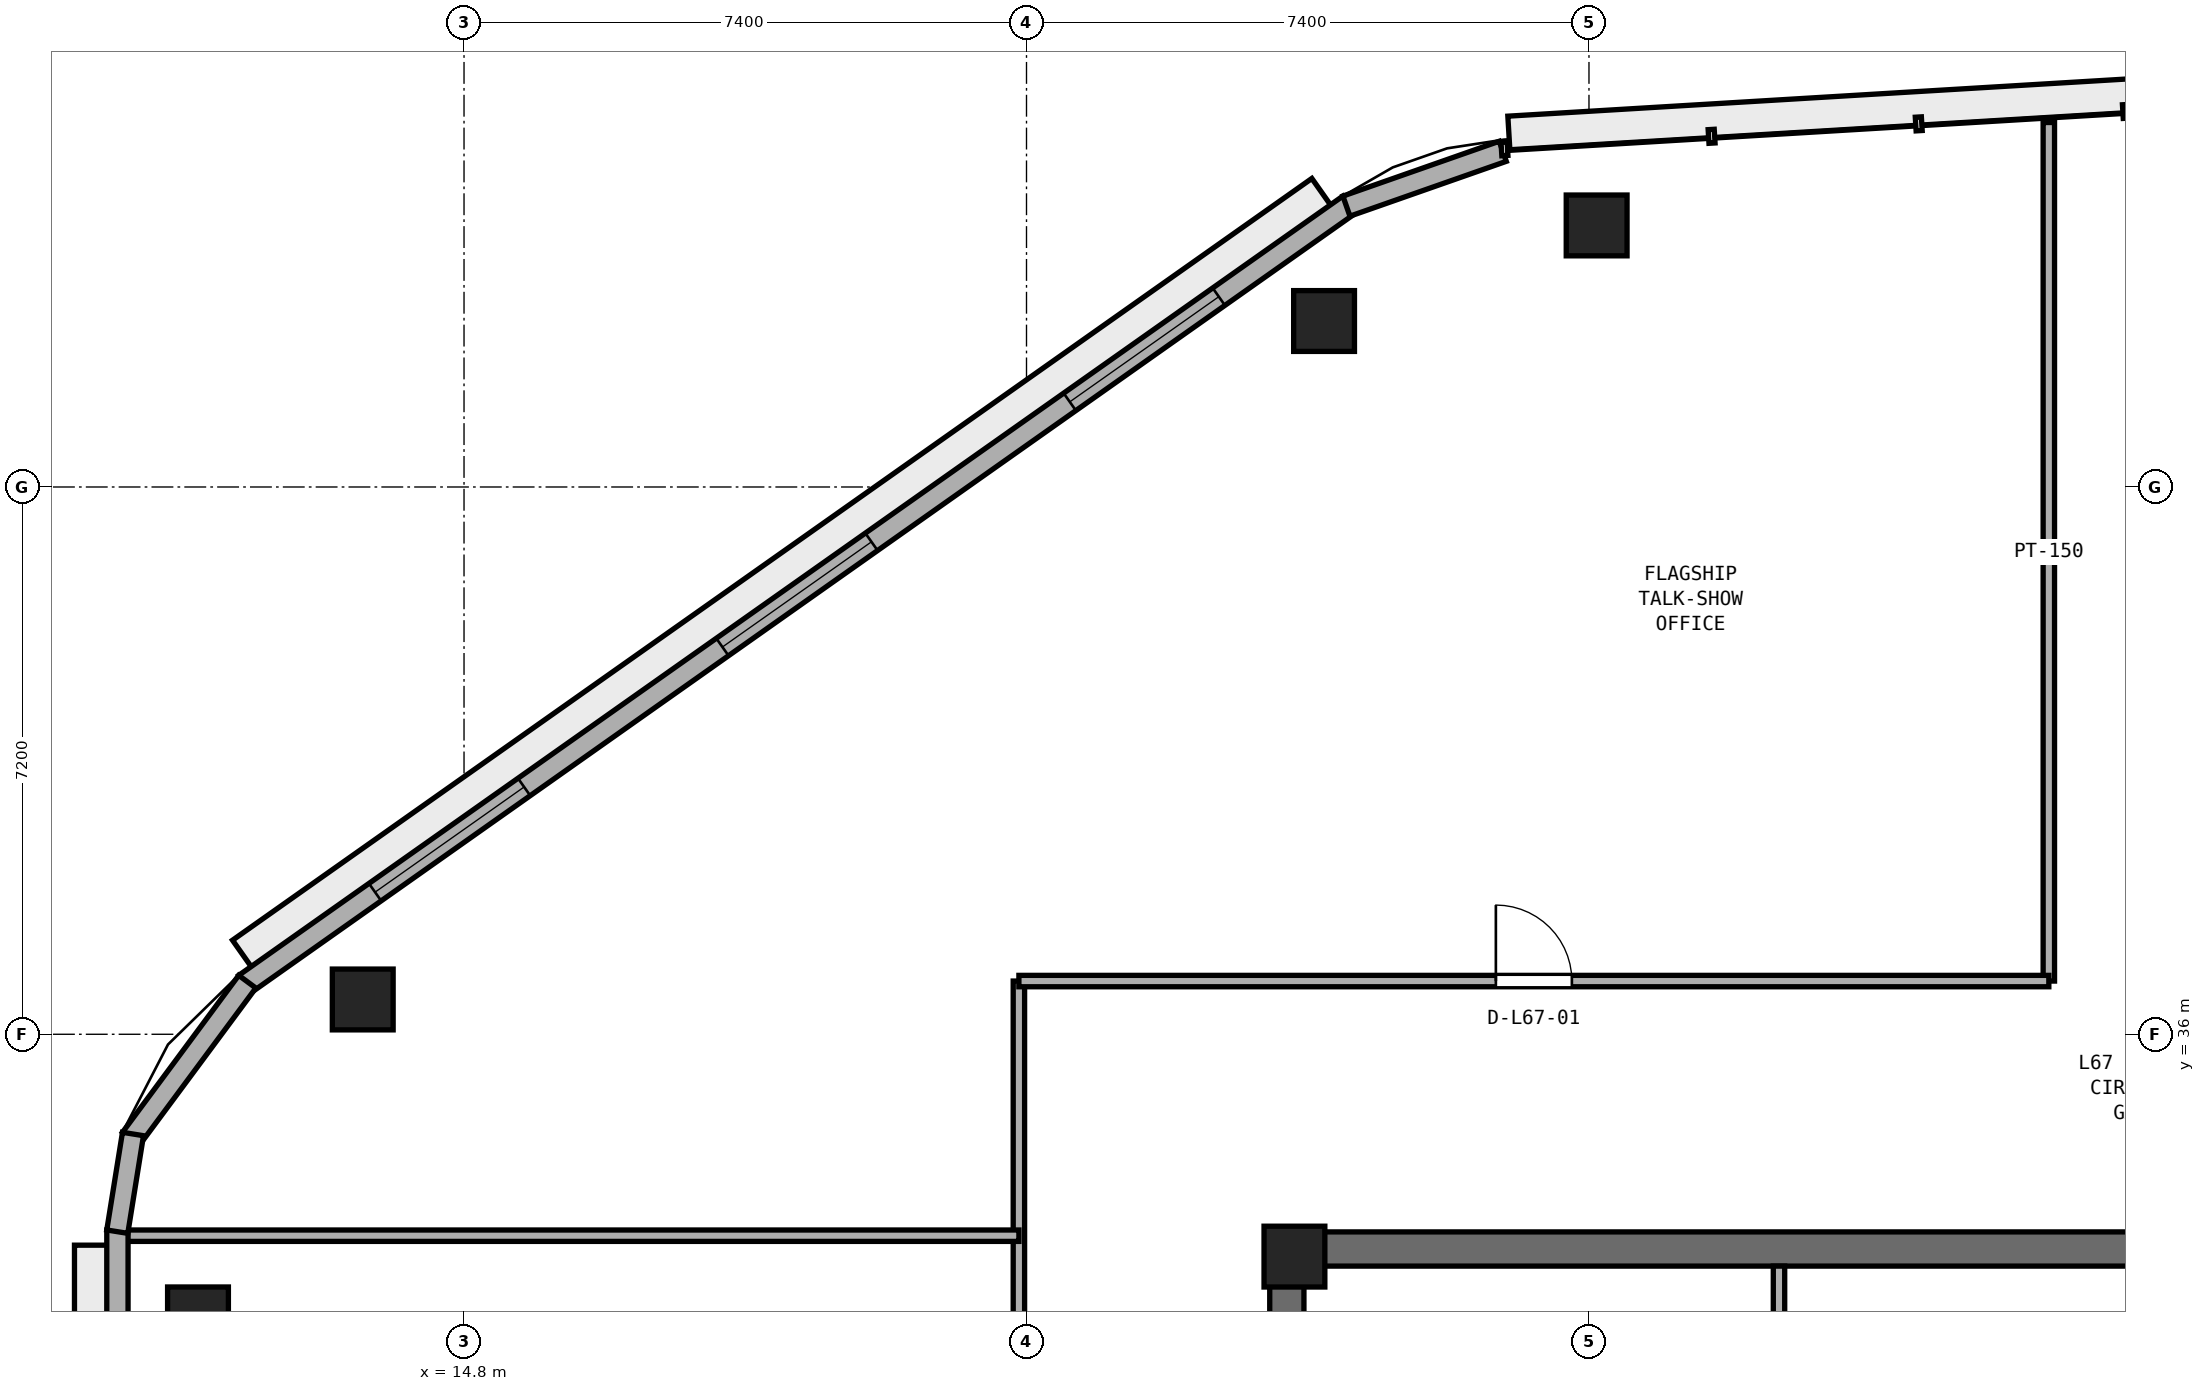
"""IFC4 building model, lengths in metres.
Left out: names, types, materials, properties, quantities, classifications, styles, units other than length and angle.
Written with IfcOpenShell. Run it as: python <this file> out.ifc"""

import sys

from ifc_helpers import new_model, si_unit, direction, frame, frame_2d, origin, origin_2d, place, context, subcontext, project, spatial, rectangle, extrude, element, fill, save


model = new_model("IFC4")
c1 = context("Model", 3, precision=1e-05, world=origin(), true_north=direction((0.0, 1.0)))
c2 = subcontext(c1, "Body", "Model", "MODEL_VIEW")
j1 = project(units=[si_unit("LENGTHUNIT", "METRE"), si_unit("PLANEANGLEUNIT", "RADIAN")], contexts=[c1])
p1 = place(None, origin())
s1 = spatial("IfcSite", under=j1, at=p1, CompositionType="ELEMENT")
p2 = place(p1, origin())
s2 = spatial("IfcBuilding", under=s1, at=p2, CompositionType="ELEMENT")
p3 = place(p2, frame((0.0, 0.0, 263.0)))
s3 = spatial("IfcBuildingStorey", under=s2, at=p3, CompositionType="ELEMENT", Elevation=263.0)
p4 = place(p3, frame((25.4, 33.175, 0.0), z_axis=(0.0, 0.0, 1.0), x_axis=(1.0, 0.0, 0.0)))
e1 = element("IfcWall", 1, at=p4, inside=s3, PredefinedType="SHEAR", context=c2, shape_type="SweptSolid", body=[
    extrude(rectangle(XDim=23.2, YDim=0.45, at=frame_2d((11.6, 0.0))), origin(), (0.0, 0.0, 1.0), 3.51),
])
p5 = place(p3, frame((25.625, 17.45, 0.0), z_axis=(0.0, 0.0, 1.0), x_axis=(0.0, 1.0, 0.0)))
e2 = element("IfcWall", 2, at=p5, inside=s3, PredefinedType="SHEAR", context=c2, shape_type="SweptSolid", body=[
    extrude(rectangle(XDim=15.5, YDim=0.45, at=frame_2d((7.75, 0.0))), origin(), (0.0, 0.0, 1.0), 3.51),
])
p6 = place(p5, frame((7.0, 0.0, 0.0)))
e3 = element("IfcOpeningElement", 3, at=p6, cuts=e2, PredefinedType="OPENING", context=c2, shape_type="SweptSolid", body=[
    extrude(rectangle(XDim=1.5, YDim=2.15, at=frame_2d((0.75, 1.075))), frame((0.0, 0.235, 0.0), z_axis=(0.0, -1.0, 0.0), x_axis=(1.0, 0.0, 0.0)), (0.0, 0.0, 1.0), 0.47),
])
p7 = place(p3, frame((25.725, 33.075, 0.0), z_axis=(0.0, 0.0, 1.0), x_axis=(1.0, 0.0, 0.0)))
e4 = element("IfcColumn", 4, at=p7, inside=s3, PredefinedType="PILASTER", context=c2, shape_type="SweptSolid", body=[
    extrude(rectangle(XDim=0.8, YDim=0.8, at=origin_2d()), origin(), (0.0, 0.0, 1.0), 3.8),
])
for number, where, z_axis, x_axis in (
    (5, (29.701, 46.641, 0.0), (0.0, 0.0, 1.0), (1.0, 0.0, 0.0)),
    (6, (26.115, 45.384, 0.0), (0.0, 0.0, 1.0), (1.0, 0.0, 0.0)),
    (7, (13.467, 36.458, 0.0), (0.0, 0.0, 1.0), (1.0, 0.0, 0.0)),
    (8, (11.3, 32.275, 0.0), (0.0, 0.0, 1.0), (1.0, 0.0, 0.0)),
):
    element("IfcColumn", number, at=place(p3, frame(where, z_axis=z_axis, x_axis=x_axis)), inside=s3, PredefinedType="COLUMN", context=c2, shape_type="SweptSolid", body=[
        extrude(rectangle(XDim=0.8, YDim=0.8, at=origin_2d()), origin(), (0.0, 0.0, 1.0), 3.8),
    ])
p8 = place(p3, frame((32.1, 30.65, 0.0), z_axis=(0.0, 0.0, 1.0), x_axis=(0.0, 1.0, 0.0)))
e9 = element("IfcWall", 9, at=p8, inside=s3, PredefinedType="PARTITIONING", context=c2, shape_type="SweptSolid", body=[
    extrude(rectangle(XDim=2.3, YDim=0.15, at=frame_2d((1.15, 0.0))), origin(), (0.0, 0.0, 1.0), 3.51),
])
p9 = place(p3, frame((35.65, 36.7, 0.0), z_axis=(0.0, 0.0, 1.0), x_axis=(0.0, 1.0, 0.0)))
e10 = element("IfcWall", 10, at=p9, inside=s3, PredefinedType="PARTITIONING", context=c2, shape_type="SweptSolid", body=[
    extrude(rectangle(XDim=11.295, YDim=0.15, at=frame_2d((5.648, 0.0))), origin(), (0.0, 0.0, 1.0), 3.51),
])
p10 = place(p3, frame((22.1, 6.248, 0.0), z_axis=(0.0, 0.0, 1.0), x_axis=(0.0, 1.0, 0.0)))
e11 = element("IfcWall", 11, at=p10, inside=s3, PredefinedType="PARTITIONING", context=c2, shape_type="SweptSolid", body=[
    extrude(rectangle(XDim=30.452, YDim=0.15, at=frame_2d((15.226, 0.0))), origin(), (0.0, 0.0, 1.0), 3.51),
])
p11 = place(p10, frame((11.252, 0.0, 0.0)))
e12 = element("IfcOpeningElement", 12, at=p11, cuts=e11, PredefinedType="OPENING", context=c2, shape_type="SweptSolid", body=[
    extrude(rectangle(XDim=0.9, YDim=2.1, at=frame_2d((0.45, 1.05))), frame((0.0, 0.085, 0.0), z_axis=(0.0, -1.0, 0.0), x_axis=(1.0, 0.0, 0.0)), (0.0, 0.0, 1.0), 0.17),
])
p12 = place(p10, frame((21.077, 0.0, 0.0)))
e13 = element("IfcOpeningElement", 13, at=p12, cuts=e11, PredefinedType="OPENING", context=c2, shape_type="SweptSolid", body=[
    extrude(rectangle(XDim=0.9, YDim=2.1, at=frame_2d((0.45, 1.05))), frame((0.0, 0.085, 0.0), z_axis=(0.0, -1.0, 0.0), x_axis=(1.0, 0.0, 0.0)), (0.0, 0.0, 1.0), 0.17),
])
p13 = place(p3, frame((10.305, 33.35, 0.0), z_axis=(0.0, 0.0, 1.0), x_axis=(1.0, 0.0, 0.0)))
e14 = element("IfcWall", 14, at=p13, inside=s3, PredefinedType="PARTITIONING", context=c2, shape_type="SweptSolid", body=[
    extrude(rectangle(XDim=11.795, YDim=0.15, at=frame_2d((5.897, 0.0))), origin(), (0.0, 0.0, 1.0), 3.51),
])
p14 = place(p3, frame((22.1, 36.7, 0.0), z_axis=(0.0, 0.0, 1.0), x_axis=(1.0, 0.0, 0.0)))
e15 = element("IfcWall", 15, at=p14, inside=s3, PredefinedType="PARTITIONING", context=c2, shape_type="SweptSolid", body=[
    extrude(rectangle(XDim=13.55, YDim=0.15, at=frame_2d((6.775, 0.0))), origin(), (0.0, 0.0, 1.0), 3.51),
])
p15 = place(p14, frame((6.275, 0.0, 0.0)))
e16 = element("IfcOpeningElement", 16, at=p15, cuts=e15, PredefinedType="OPENING", context=c2, shape_type="SweptSolid", body=[
    extrude(rectangle(XDim=1.0, YDim=2.12, at=frame_2d((0.5, 1.06))), frame((0.0, 0.085, 0.0), z_axis=(0.0, -1.0, 0.0), x_axis=(1.0, 0.0, 0.0)), (0.0, 0.0, 1.0), 0.17),
])
p16 = place(p3, frame((26.443, 46.913, 0.0), z_axis=(0.0, 0.0, 1.0), x_axis=(-0.817024179766, -0.576603407619, 0.0)))
e17 = element("IfcWall", 17, at=p16, inside=s3, PredefinedType="STANDARD", context=c2, shape_type="SweptSolid", body=[
    extrude(rectangle(XDim=17.78, YDim=0.28, at=frame_2d((8.89, 0.0))), origin(), (0.0, 0.0, 1.0), 3.51),
])
p17 = place(p16, frame((2.097, 0.0, 0.9)))
e18 = element("IfcOpeningElement", 18, at=p17, cuts=e17, PredefinedType="OPENING", context=c2, shape_type="SweptSolid", body=[
    extrude(rectangle(XDim=2.4, YDim=1.75, at=frame_2d((1.2, 0.875))), frame((0.0, 0.15, 0.0), z_axis=(0.0, -1.0, 0.0), x_axis=(1.0, 0.0, 0.0)), (0.0, 0.0, 1.0), 0.3),
])
p18 = place(p16, frame((7.69, 0.0, 0.9)))
e19 = element("IfcOpeningElement", 19, at=p18, cuts=e17, PredefinedType="OPENING", context=c2, shape_type="SweptSolid", body=[
    extrude(rectangle(XDim=2.4, YDim=1.75, at=frame_2d((1.2, 0.875))), frame((0.0, 0.15, 0.0), z_axis=(0.0, -1.0, 0.0), x_axis=(1.0, 0.0, 0.0)), (0.0, 0.0, 1.0), 0.3),
])
p19 = place(p16, frame((13.283, 0.0, 0.9)))
e20 = element("IfcOpeningElement", 20, at=p19, cuts=e17, PredefinedType="OPENING", context=c2, shape_type="SweptSolid", body=[
    extrude(rectangle(XDim=2.4, YDim=1.75, at=frame_2d((1.2, 0.875))), frame((0.0, 0.15, 0.0), z_axis=(0.0, -1.0, 0.0), x_axis=(1.0, 0.0, 0.0)), (0.0, 0.0, 1.0), 0.3),
])
p20 = place(p3, frame((10.24, 33.425, 0.0), z_axis=(0.0, 0.0, 1.0), x_axis=(0.0, -1.0, 0.0)))
e21 = element("IfcWall", 21, at=p20, inside=s3, PredefinedType="STANDARD", context=c2, shape_type="SweptSolid", body=[
    extrude(rectangle(XDim=17.257, YDim=0.28, at=frame_2d((8.628, 0.0))), origin(), (0.0, 0.0, 1.0), 3.51),
])
p21 = place(p20, frame((8.078, 0.0, 0.0)))
e22 = element("IfcOpeningElement", 22, at=p21, cuts=e21, PredefinedType="OPENING", context=c2, shape_type="SweptSolid", body=[
    extrude(rectangle(XDim=1.1, YDim=2.2, at=frame_2d((0.55, 1.1))), frame((0.0, 0.15, 0.0), z_axis=(0.0, -1.0, 0.0), x_axis=(1.0, 0.0, 0.0)), (0.0, 0.0, 1.0), 0.3),
])
p22 = place(p20, frame((2.01, 0.0, 0.9)))
e23 = element("IfcOpeningElement", 23, at=p22, cuts=e21, PredefinedType="OPENING", context=c2, shape_type="SweptSolid", body=[
    extrude(rectangle(XDim=2.4, YDim=1.75, at=frame_2d((1.2, 0.875))), frame((0.0, 0.15, 0.0), z_axis=(0.0, -1.0, 0.0), x_axis=(1.0, 0.0, 0.0)), (0.0, 0.0, 1.0), 0.3),
])
p23 = place(p20, frame((12.847, 0.0, 0.9)))
e24 = element("IfcOpeningElement", 24, at=p23, cuts=e21, PredefinedType="OPENING", context=c2, shape_type="SweptSolid", body=[
    extrude(rectangle(XDim=2.4, YDim=1.75, at=frame_2d((1.2, 0.875))), frame((0.0, 0.15, 0.0), z_axis=(0.0, -1.0, 0.0), x_axis=(1.0, 0.0, 0.0)), (0.0, 0.0, 1.0), 0.3),
])
p24 = place(p3, frame((28.466, 47.616, 0.0), z_axis=(0.0, 0.0, 1.0), x_axis=(-0.94368711622, -0.330839276206, 0.0)))
e25 = element("IfcWall", 25, at=p24, inside=s3, PredefinedType="STANDARD", context=c2, shape_type="SweptSolid", body=[
    extrude(rectangle(XDim=2.18, YDim=0.28, at=frame_2d((1.09, 0.0))), origin(), (0.0, 0.0, 1.0), 3.51),
])
p25 = place(p3, frame((11.948, 36.692, 0.0), z_axis=(0.0, 0.0, 1.0), x_axis=(-0.595170751493, -0.803599263668, 0.0)))
e26 = element("IfcWall", 26, at=p25, inside=s3, PredefinedType="STANDARD", context=c2, shape_type="SweptSolid", body=[
    extrude(rectangle(XDim=2.57, YDim=0.28, at=frame_2d((1.285, 0.0))), origin(), (0.0, 0.0, 1.0), 3.51),
])
p26 = place(p3, frame((10.445, 34.688, 0.0), z_axis=(0.0, 0.0, 1.0), x_axis=(-0.158524605336, -0.987355027081, 0.0)))
e27 = element("IfcWall", 27, at=p26, inside=s3, PredefinedType="STANDARD", context=c2, shape_type="SweptSolid", body=[
    extrude(rectangle(XDim=1.301, YDim=0.28, at=frame_2d((0.651, 0.0))), origin(), (0.0, 0.0, 1.0), 3.51),
])
p27 = place(p15, origin())
e28 = element("IfcDoor", 28, at=p27, inside=s3, OperationType="SINGLE_SWING_LEFT", PredefinedType="DOOR", context=c2, shape_type="SweptSolid", body=[
    extrude(rectangle(XDim=1.0, YDim=2.12, at=frame_2d((0.5, 1.06))), frame((0.0, 0.025, 0.0), z_axis=(0.0, -1.0, 0.0), x_axis=(1.0, 0.0, 0.0)), (0.0, 0.0, 1.0), 0.05),
])
fill(e16, e28)
p28 = place(p17, origin())
e29 = element("IfcWindow", 29, at=p28, inside=s3, PartitioningType="SINGLE_PANEL", PredefinedType="WINDOW", context=c2, shape_type="SweptSolid", body=[
    extrude(rectangle(XDim=2.4, YDim=1.75, at=frame_2d((1.2, 0.875))), frame((0.0, 0.03, 0.0), z_axis=(0.0, -1.0, 0.0), x_axis=(1.0, 0.0, 0.0)), (0.0, 0.0, 1.0), 0.06),
])
fill(e18, e29)
p29 = place(p18, origin())
e30 = element("IfcWindow", 30, at=p29, inside=s3, PartitioningType="SINGLE_PANEL", PredefinedType="WINDOW", context=c2, shape_type="SweptSolid", body=[
    extrude(rectangle(XDim=2.4, YDim=1.75, at=frame_2d((1.2, 0.875))), frame((0.0, 0.03, 0.0), z_axis=(0.0, -1.0, 0.0), x_axis=(1.0, 0.0, 0.0)), (0.0, 0.0, 1.0), 0.06),
])
fill(e19, e30)
p30 = place(p19, origin())
e31 = element("IfcWindow", 31, at=p30, inside=s3, PartitioningType="SINGLE_PANEL", PredefinedType="WINDOW", context=c2, shape_type="SweptSolid", body=[
    extrude(rectangle(XDim=2.4, YDim=1.75, at=frame_2d((1.2, 0.875))), frame((0.0, 0.03, 0.0), z_axis=(0.0, -1.0, 0.0), x_axis=(1.0, 0.0, 0.0)), (0.0, 0.0, 1.0), 0.06),
])
fill(e20, e31)
save(model, sys.argv[1])
